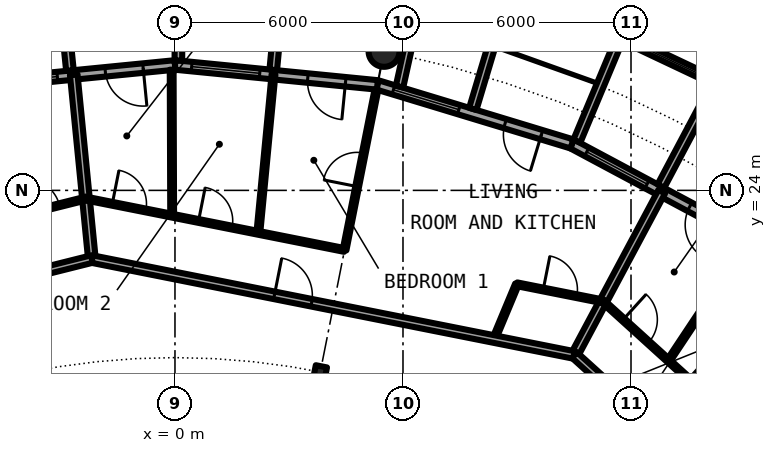
"""IFC4 building model, lengths in metres.
Left out: names, types, materials, properties, quantities, classifications, styles, units other than length and angle.
Written with IfcOpenShell. Run it as: python <this file> out.ifc"""

import sys

from ifc_helpers import new_model, si_unit, direction, frame, frame_2d, origin, origin_2d, place, context, subcontext, project, spatial, rectangle, circle, hollow_circle, i_section, extrude, element, fill, save


model = new_model("IFC4")
c1 = context("Model", 3, precision=1e-05, world=origin(), true_north=direction((0.0, 1.0)))
c2 = subcontext(c1, "Body", "Model", "MODEL_VIEW")
j1 = project(units=[si_unit("LENGTHUNIT", "METRE"), si_unit("PLANEANGLEUNIT", "RADIAN")], contexts=[c1])
p1 = place(None, origin())
s1 = spatial("IfcSite", under=j1, at=p1, CompositionType="ELEMENT")
p2 = place(p1, origin())
s2 = spatial("IfcBuilding", under=s1, at=p2, CompositionType="ELEMENT")
p3 = place(p2, frame((0.0, 0.0, 227.95)))
s3 = spatial("IfcBuildingStorey", under=s2, at=p3, CompositionType="ELEMENT", Elevation=227.95)
p4 = place(p3, frame((5.501, 27.658, 0.0), z_axis=(0.0, 0.0, 1.0), x_axis=(1.0, 0.0, 0.0)))
e1 = element("IfcColumn", 1, at=p4, inside=s3, PredefinedType="COLUMN", context=c2, shape_type="SweptSolid", body=[
    extrude(hollow_circle(Radius=0.406, WallThickness=0.03, at=origin_2d()), origin(), (0.0, 0.0, 1.0), 3.05),
])
p5 = place(p3, frame((3.824, 19.223, 0.0), z_axis=(0.0, 0.0, 1.0), x_axis=(0.195090322016, 0.980785280403, 0.0)))
e2 = element("IfcColumn", 2, at=p5, inside=s3, PredefinedType="COLUMN", context=c2, shape_type="SweptSolid", body=[
    extrude(i_section(OverallWidth=0.3, OverallDepth=0.3, WebThickness=0.011, FlangeThickness=0.019, FilletRadius=0.027, at=origin_2d()), origin(), (0.0, 0.0, 1.0), 3.05),
])
p6 = place(p3, frame((15.167, 22.699, 0.0), z_axis=(0.0, 0.0, 1.0), x_axis=(-0.881915646801, 0.471407246368, 0.0)))
e3 = element("IfcWall", 3, at=p6, inside=s3, PredefinedType="SOLIDWALL", context=c2, shape_type="SweptSolid", body=[
    extrude(rectangle(XDim=5.352, YDim=0.25, at=frame_2d((2.676, 0.0))), origin(), (0.0, 0.0, 1.0), 2.7),
])
p7 = place(p6, frame((0.841, 0.0, 0.0)))
e4 = element("IfcOpeningElement", 4, at=p7, cuts=e3, PredefinedType="OPENING", context=c2, shape_type="SweptSolid", body=[
    extrude(rectangle(XDim=1.0, YDim=2.2, at=frame_2d((0.5, 1.1))), frame((0.0, 0.135, 0.0), z_axis=(0.0, -1.0, 0.0), x_axis=(1.0, 0.0, 0.0)), (0.0, 0.0, 1.0), 0.27),
])
p8 = place(p6, frame((3.111, 0.0, 0.3)))
e5 = element("IfcOpeningElement", 5, at=p8, cuts=e3, PredefinedType="OPENING", context=c2, shape_type="SweptSolid", body=[
    extrude(rectangle(XDim=1.8, YDim=2.1, at=frame_2d((0.9, 1.05))), frame((0.0, 0.135, 0.0), z_axis=(0.0, -1.0, 0.0), x_axis=(1.0, 0.0, 0.0)), (0.0, 0.0, 1.0), 0.27),
])
p9 = place(p3, frame((14.335, 26.808, -0.03), z_axis=(0.0, 0.0, 1.0), x_axis=(-0.904000060331, 0.427532327342, 0.0)))
e6 = element("IfcWall", 6, at=p9, inside=s3, PredefinedType="SOLIDWALL", context=c2, shape_type="SweptSolid", body=[
    extrude(rectangle(XDim=2.993, YDim=0.2, at=frame_2d((1.497, 0.0))), origin(), (0.0, 0.0, 1.0), 2.73),
])
p10 = place(p9, frame((0.457, 0.0, 0.33)))
e7 = element("IfcOpeningElement", 7, at=p10, cuts=e6, PredefinedType="OPENING", context=c2, shape_type="SweptSolid", body=[
    extrude(circle(Radius=1.04, at=frame_2d((1.04, 1.04))), frame((0.0, 0.11, 0.0), z_axis=(0.0, -1.0, 0.0), x_axis=(1.0, 0.0, 0.0)), (0.0, 0.0, 1.0), 0.22),
])
p11 = place(p3, frame((12.787, 24.113, -0.03), z_axis=(0.0, 0.0, 1.0), x_axis=(0.468365282436, 0.883534924159, 0.0)))
e8 = element("IfcWall", 8, at=p11, inside=s3, PredefinedType="SOLIDWALL", context=c2, shape_type="SweptSolid", body=[
    extrude(rectangle(XDim=3.006, YDim=0.2, at=frame_2d((1.503, 0.0))), origin(), (0.0, 0.0, 1.0), 2.73),
])
p12 = place(p3, frame((10.575, 25.295, -0.03), z_axis=(0.0, 0.0, 1.0), x_axis=(0.385697364644, 0.922625353492, 0.0)))
e9 = element("IfcWall", 9, at=p12, inside=s3, PredefinedType="SOLIDWALL", context=c2, shape_type="SweptSolid", body=[
    extrude(rectangle(XDim=2.883, YDim=0.2, at=frame_2d((1.442, 0.0))), origin(), (0.0, 0.0, 1.0), 2.73),
])
p13 = place(p3, frame((10.447, 25.222, 0.0), z_axis=(0.0, 0.0, 1.0), x_axis=(-0.956965678721, 0.290201119486, 0.0)))
e10 = element("IfcWall", 10, at=p13, inside=s3, PredefinedType="SOLIDWALL", context=c2, shape_type="SweptSolid", body=[
    extrude(rectangle(XDim=5.351, YDim=0.25, at=frame_2d((2.676, 0.0))), origin(), (0.0, 0.0, 1.0), 2.7),
])
p14 = place(p13, frame((0.841, 0.0, 0.0)))
e11 = element("IfcOpeningElement", 11, at=p14, cuts=e10, PredefinedType="OPENING", context=c2, shape_type="SweptSolid", body=[
    extrude(rectangle(XDim=1.0, YDim=2.2, at=frame_2d((0.5, 1.1))), frame((0.0, 0.135, 0.0), z_axis=(0.0, -1.0, 0.0), x_axis=(1.0, 0.0, 0.0)), (0.0, 0.0, 1.0), 0.27),
])
p15 = place(p13, frame((3.111, 0.0, 0.3)))
e12 = element("IfcOpeningElement", 12, at=p15, cuts=e10, PredefinedType="OPENING", context=c2, shape_type="SweptSolid", body=[
    extrude(rectangle(XDim=1.8, YDim=2.1, at=frame_2d((0.9, 1.05))), frame((0.0, 0.135, 0.0), z_axis=(0.0, -1.0, 0.0), x_axis=(1.0, 0.0, 0.0)), (0.0, 0.0, 1.0), 0.27),
])
p16 = place(p3, frame((7.837, 26.144, -0.03), z_axis=(0.0, 0.0, 1.0), x_axis=(0.287064767992, 0.957911174889, 0.0)))
e13 = element("IfcWall", 13, at=p16, inside=s3, PredefinedType="SOLIDWALL", context=c2, shape_type="SweptSolid", body=[
    extrude(rectangle(XDim=3.006, YDim=0.2, at=frame_2d((1.503, 0.0))), origin(), (0.0, 0.0, 1.0), 2.73),
])
p17 = place(p3, frame((5.909, 26.729, -0.03), z_axis=(0.0, 0.0, 1.0), x_axis=(0.216409053917, 0.976302781612, 0.0)))
e14 = element("IfcWall", 14, at=p17, inside=s3, PredefinedType="SOLIDWALL", context=c2, shape_type="SweptSolid", body=[
    extrude(rectangle(XDim=2.925, YDim=0.2, at=frame_2d((1.463, 0.0))), origin(), (0.0, 0.0, 1.0), 2.73),
])
p18 = place(p3, frame((5.326, 26.775, 0.0), z_axis=(0.0, 0.0, 1.0), x_axis=(-0.995173996315, 0.098126026407, 0.0)))
e15 = element("IfcWall", 15, at=p18, inside=s3, PredefinedType="SOLIDWALL", context=c2, shape_type="SweptSolid", body=[
    extrude(rectangle(XDim=5.352, YDim=0.25, at=frame_2d((2.676, 0.0))), origin(), (0.0, 0.0, 1.0), 2.7),
])
p19 = place(p18, frame((0.841, 0.0, 0.0)))
e16 = element("IfcOpeningElement", 16, at=p19, cuts=e15, PredefinedType="OPENING", context=c2, shape_type="SweptSolid", body=[
    extrude(rectangle(XDim=1.0, YDim=2.2, at=frame_2d((0.5, 1.1))), frame((0.0, 0.135, 0.0), z_axis=(0.0, -1.0, 0.0), x_axis=(1.0, 0.0, 0.0)), (0.0, 0.0, 1.0), 0.27),
])
p20 = place(p18, frame((3.111, 0.0, 0.3)))
e17 = element("IfcOpeningElement", 17, at=p20, cuts=e15, PredefinedType="OPENING", context=c2, shape_type="SweptSolid", body=[
    extrude(rectangle(XDim=1.8, YDim=2.1, at=frame_2d((0.9, 1.05))), frame((0.0, 0.135, 0.0), z_axis=(0.0, -1.0, 0.0), x_axis=(1.0, 0.0, 0.0)), (0.0, 0.0, 1.0), 0.27),
])
p21 = place(p3, frame((2.586, 27.171, -0.03), z_axis=(0.0, 0.0, 1.0), x_axis=(0.094548432284, 0.995520262954, 0.0)))
e18 = element("IfcWall", 18, at=p21, inside=s3, PredefinedType="SOLIDWALL", context=c2, shape_type="SweptSolid", body=[
    extrude(rectangle(XDim=3.006, YDim=0.2, at=frame_2d((1.503, 0.0))), origin(), (0.0, 0.0, 1.0), 2.73),
])
p22 = place(p3, frame((0.09, 27.417, -0.03), z_axis=(0.0, 0.0, 1.0), x_axis=(0.00347308367, 0.999993968827, 0.0)))
e19 = element("IfcWall", 19, at=p22, inside=s3, PredefinedType="SOLIDWALL", context=c2, shape_type="SweptSolid", body=[
    extrude(rectangle(XDim=2.882, YDim=0.2, at=frame_2d((1.441, 0.0))), origin(), (0.0, 0.0, 1.0), 2.73),
])
p23 = place(p3, frame((0.0, 27.3, 0.0), z_axis=(0.0, 0.0, 1.0), x_axis=(-0.995173996315, -0.098126026407, 0.0)))
e20 = element("IfcWall", 20, at=p23, inside=s3, PredefinedType="SOLIDWALL", context=c2, shape_type="SweptSolid", body=[
    extrude(rectangle(XDim=5.352, YDim=0.25, at=frame_2d((2.676, 0.0))), origin(), (0.0, 0.0, 1.0), 2.7),
])
p24 = place(p23, frame((0.841, 0.0, 0.0)))
e21 = element("IfcOpeningElement", 21, at=p24, cuts=e20, PredefinedType="OPENING", context=c2, shape_type="SweptSolid", body=[
    extrude(rectangle(XDim=1.0, YDim=2.2, at=frame_2d((0.5, 1.1))), frame((0.0, 0.135, 0.0), z_axis=(0.0, -1.0, 0.0), x_axis=(1.0, 0.0, 0.0)), (0.0, 0.0, 1.0), 0.27),
])
p25 = place(p23, frame((3.111, 0.0, 0.3)))
e22 = element("IfcOpeningElement", 22, at=p25, cuts=e20, PredefinedType="OPENING", context=c2, shape_type="SweptSolid", body=[
    extrude(rectangle(XDim=1.8, YDim=2.1, at=frame_2d((0.9, 1.05))), frame((0.0, 0.135, 0.0), z_axis=(0.0, -1.0, 0.0), x_axis=(1.0, 0.0, 0.0)), (0.0, 0.0, 1.0), 0.27),
])
p26 = place(p3, frame((-2.764, 27.153, -0.03), z_axis=(0.0, 0.0, 1.0), x_axis=(-0.101505487237, 0.994834979311, 0.0)))
e23 = element("IfcWall", 23, at=p26, inside=s3, PredefinedType="SOLIDWALL", context=c2, shape_type="SweptSolid", body=[
    extrude(rectangle(XDim=3.007, YDim=0.2, at=frame_2d((1.503, 0.0))), origin(), (0.0, 0.0, 1.0), 2.73),
])
p27 = place(p3, frame((-2.664, 27.044, 0.0), z_axis=(0.0, 0.0, 1.0), x_axis=(0.098070432075, -0.995179476453, 0.0)))
e24 = element("IfcWall", 24, at=p27, inside=s3, PredefinedType="PARTITIONING", context=c2, shape_type="SweptSolid", body=[
    extrude(rectangle(XDim=4.874, YDim=0.2, at=frame_2d((2.437, 0.0))), origin(), (0.0, 0.0, 1.0), 2.7),
])
p28 = place(p3, frame((-0.074, 23.334, 0.0), z_axis=(0.0, 0.0, 1.0), x_axis=(-0.003368696325, 0.999994325926, 0.0)))
e25 = element("IfcWall", 25, at=p28, inside=s3, PredefinedType="PARTITIONING", context=c2, shape_type="SweptSolid", body=[
    extrude(rectangle(XDim=3.841, YDim=0.1, at=frame_2d((1.92, 0.0))), origin(), (0.0, 0.0, 1.0), 2.7),
])
p29 = place(p3, frame((2.194, 22.883, 0.0), z_axis=(0.0, 0.0, 1.0), x_axis=(0.095276864271, 0.995450812012, 0.0)))
e26 = element("IfcWall", 26, at=p29, inside=s3, PredefinedType="PARTITIONING", context=c2, shape_type="SweptSolid", body=[
    extrude(rectangle(XDim=4.187, YDim=0.1, at=frame_2d((2.094, 0.0))), origin(), (0.0, 0.0, 1.0), 2.7),
])
p30 = place(p3, frame((4.462, 22.431, 0.0), z_axis=(0.0, 0.0, 1.0), x_axis=(0.195145394338, 0.98077432423, 0.0)))
e27 = element("IfcWall", 27, at=p30, inside=s3, PredefinedType="PARTITIONING", context=c2, shape_type="SweptSolid", body=[
    extrude(rectangle(XDim=4.305, YDim=0.1, at=frame_2d((2.152, 0.0))), origin(), (0.0, 0.0, 1.0), 2.7),
])
p31 = place(p30, frame((1.702, 0.0, 0.0)))
e28 = element("IfcOpeningElement", 28, at=p31, cuts=e27, PredefinedType="OPENING", context=c2, shape_type="SweptSolid", body=[
    extrude(rectangle(XDim=0.9, YDim=2.3, at=frame_2d((0.45, 1.15))), frame((0.0, 0.06, 0.0), z_axis=(0.0, -1.0, 0.0), x_axis=(1.0, 0.0, 0.0)), (0.0, 0.0, 1.0), 0.12),
])
p32 = place(p3, frame((8.396, 20.088, 0.0), z_axis=(0.0, 0.0, 1.0), x_axis=(0.385469858593, 0.922720427929, 0.0)))
e29 = element("IfcWall", 29, at=p32, inside=s3, PredefinedType="PARTITIONING", context=c2, shape_type="SweptSolid", body=[
    extrude(rectangle(XDim=1.562, YDim=0.1, at=frame_2d((0.781, 0.0))), origin(), (0.0, 0.0, 1.0), 2.7),
])
p33 = place(p3, frame((10.512, 19.667, 0.0), z_axis=(0.0, 0.0, 1.0), x_axis=(0.471271812246, 0.881988026553, 0.0)))
e30 = element("IfcWall", 30, at=p33, inside=s3, PredefinedType="PARTITIONING", context=c2, shape_type="SweptSolid", body=[
    extrude(rectangle(XDim=4.874, YDim=0.2, at=frame_2d((2.437, 0.0))), origin(), (0.0, 0.0, 1.0), 2.7),
])
p34 = place(p3, frame((12.988, 19.518, 0.0), z_axis=(0.0, 0.0, 1.0), x_axis=(0.553823887887, 0.83263383381, 0.0)))
e31 = element("IfcWall", 31, at=p34, inside=s3, PredefinedType="PARTITIONING", context=c2, shape_type="SweptSolid", body=[
    extrude(rectangle(XDim=3.73, YDim=0.1, at=frame_2d((1.865, 0.0))), origin(), (0.0, 0.0, 1.0), 2.7),
])
p35 = place(p3, frame((-2.186, 22.193, 0.0), z_axis=(0.0, 0.0, 1.0), x_axis=(0.980780341017, -0.195115152343, 0.0)))
e32 = element("IfcWall", 32, at=p35, inside=s3, PredefinedType="PARTITIONING", context=c2, shape_type="SweptSolid", body=[
    extrude(rectangle(XDim=12.947, YDim=0.2, at=frame_2d((6.473, 0.0))), origin(), (0.0, 0.0, 1.0), 2.7),
])
p36 = place(p35, frame((4.895, 0.0, 0.0)))
e33 = element("IfcOpeningElement", 33, at=p36, cuts=e32, PredefinedType="OPENING", context=c2, shape_type="SweptSolid", body=[
    extrude(rectangle(XDim=1.0, YDim=2.3, at=frame_2d((0.5, 1.15))), frame((0.0, 0.11, 0.0), z_axis=(0.0, -1.0, 0.0), x_axis=(1.0, 0.0, 0.0)), (0.0, 0.0, 1.0), 0.22),
])
p37 = place(p3, frame((10.512, 19.667, 0.0), z_axis=(0.0, 0.0, 1.0), x_axis=(0.740947367223, -0.671563101283, 0.0)))
e34 = element("IfcWall", 34, at=p37, inside=s3, PredefinedType="PARTITIONING", context=c2, shape_type="SweptSolid", body=[
    extrude(rectangle(XDim=10.837, YDim=0.2, at=frame_2d((5.419, 0.0))), origin(), (0.0, 0.0, 1.0), 2.7),
])
p38 = place(p37, frame((3.835, 0.0, 0.0)))
e35 = element("IfcOpeningElement", 35, at=p38, cuts=e34, PredefinedType="OPENING", context=c2, shape_type="SweptSolid", body=[
    extrude(rectangle(XDim=1.0, YDim=2.3, at=frame_2d((0.5, 1.15))), frame((0.0, 0.11, 0.0), z_axis=(0.0, -1.0, 0.0), x_axis=(1.0, 0.0, 0.0)), (0.0, 0.0, 1.0), 0.22),
])
p39 = place(p3, frame((-8.534, 20.603, 0.0), z_axis=(0.0, 0.0, 1.0), x_axis=(0.97003047456, 0.242983288366, 0.0)))
e36 = element("IfcWall", 36, at=p39, inside=s3, PredefinedType="PARTITIONING", context=c2, shape_type="SweptSolid", body=[
    extrude(rectangle(XDim=6.544, YDim=0.2, at=frame_2d((3.272, 0.0))), origin(), (0.0, 0.0, 1.0), 2.7),
])
p40 = place(p39, frame((1.681, 0.0, 0.0)))
e37 = element("IfcOpeningElement", 37, at=p40, cuts=e36, PredefinedType="OPENING", context=c2, shape_type="SweptSolid", body=[
    extrude(rectangle(XDim=1.0, YDim=2.3, at=frame_2d((0.5, 1.15))), frame((0.0, 0.11, 0.0), z_axis=(0.0, -1.0, 0.0), x_axis=(1.0, 0.0, 0.0)), (0.0, 0.0, 1.0), 0.22),
])
p41 = place(p3, frame((-2.346, 23.785, 0.0), z_axis=(0.0, 0.0, 1.0), x_axis=(0.98080065826, -0.195012996379, 0.0)))
e38 = element("IfcWall", 38, at=p41, inside=s3, PredefinedType="PARTITIONING", context=c2, shape_type="SweptSolid", body=[
    extrude(rectangle(XDim=6.938, YDim=0.1, at=frame_2d((3.469, 0.0))), origin(), (0.0, 0.0, 1.0), 2.7),
])
p42 = place(p41, frame((3.024, 0.0, 0.0)))
e39 = element("IfcOpeningElement", 39, at=p42, cuts=e38, PredefinedType="OPENING", context=c2, shape_type="SweptSolid", body=[
    extrude(rectangle(XDim=0.9, YDim=2.3, at=frame_2d((0.45, 1.15))), frame((0.0, 0.06, 0.0), z_axis=(0.0, -1.0, 0.0), x_axis=(1.0, 0.0, 0.0)), (0.0, 0.0, 1.0), 0.12),
])
p43 = place(p41, frame((0.71, 0.0, 0.0)))
e40 = element("IfcOpeningElement", 40, at=p43, cuts=e38, PredefinedType="OPENING", context=c2, shape_type="SweptSolid", body=[
    extrude(rectangle(XDim=0.9, YDim=2.3, at=frame_2d((0.45, 1.15))), frame((0.0, 0.06, 0.0), z_axis=(0.0, -1.0, 0.0), x_axis=(1.0, 0.0, 0.0)), (0.0, 0.0, 1.0), 0.12),
])
p44 = place(p3, frame((8.998, 21.529, 0.0), z_axis=(0.0, 0.0, 1.0), x_axis=(0.980783177308, -0.19510089469, 0.0)))
e41 = element("IfcWall", 41, at=p44, inside=s3, PredefinedType="PARTITIONING", context=c2, shape_type="SweptSolid", body=[
    extrude(rectangle(XDim=2.312, YDim=0.1, at=frame_2d((1.156, 0.0))), origin(), (0.0, 0.0, 1.0), 2.7),
])
p45 = place(p44, frame((0.706, 0.0, 0.0)))
e42 = element("IfcOpeningElement", 42, at=p45, cuts=e41, PredefinedType="OPENING", context=c2, shape_type="SweptSolid", body=[
    extrude(rectangle(XDim=0.9, YDim=2.3, at=frame_2d((0.45, 1.15))), frame((0.0, 0.06, 0.0), z_axis=(0.0, -1.0, 0.0), x_axis=(1.0, 0.0, 0.0)), (0.0, 0.0, 1.0), 0.12),
])
p46 = place(p3, frame((11.266, 21.078, 0.0), z_axis=(0.0, 0.0, 1.0), x_axis=(0.74097115376, -0.671536856245, 0.0)))
e43 = element("IfcWall", 43, at=p46, inside=s3, PredefinedType="PARTITIONING", context=c2, shape_type="SweptSolid", body=[
    extrude(rectangle(XDim=6.969, YDim=0.1, at=frame_2d((3.484, 0.0))), origin(), (0.0, 0.0, 1.0), 2.7),
])
p47 = place(p46, frame((3.034, 0.0, 0.0)))
e44 = element("IfcOpeningElement", 44, at=p47, cuts=e43, PredefinedType="OPENING", context=c2, shape_type="SweptSolid", body=[
    extrude(rectangle(XDim=0.9, YDim=2.3, at=frame_2d((0.45, 1.15))), frame((0.0, 0.06, 0.0), z_axis=(0.0, -1.0, 0.0), x_axis=(1.0, 0.0, 0.0)), (0.0, 0.0, 1.0), 0.12),
])
p48 = place(p46, frame((0.712, 0.0, 0.0)))
e45 = element("IfcOpeningElement", 45, at=p48, cuts=e43, PredefinedType="OPENING", context=c2, shape_type="SweptSolid", body=[
    extrude(rectangle(XDim=0.9, YDim=2.3, at=frame_2d((0.45, 1.15))), frame((0.0, 0.06, 0.0), z_axis=(0.0, -1.0, 0.0), x_axis=(1.0, 0.0, 0.0)), (0.0, 0.0, 1.0), 0.12),
])
p49 = place(p3, frame((-4.61, 23.217, 0.0), z_axis=(0.0, 0.0, 1.0), x_axis=(0.970031792706, 0.242978026043, 0.0)))
e46 = element("IfcWall", 46, at=p49, inside=s3, PredefinedType="PARTITIONING", context=c2, shape_type="SweptSolid", body=[
    extrude(rectangle(XDim=2.337, YDim=0.1, at=frame_2d((1.168, 0.0))), origin(), (0.0, 0.0, 1.0), 2.7),
])
p50 = place(p49, frame((0.719, 0.0, 0.0)))
e47 = element("IfcOpeningElement", 47, at=p50, cuts=e46, PredefinedType="OPENING", context=c2, shape_type="SweptSolid", body=[
    extrude(rectangle(XDim=0.9, YDim=2.3, at=frame_2d((0.45, 1.15))), frame((0.0, 0.06, 0.0), z_axis=(0.0, -1.0, 0.0), x_axis=(1.0, 0.0, 0.0)), (0.0, 0.0, 1.0), 0.12),
])
p51 = place(p7, origin())
e48 = element("IfcDoor", 48, at=p51, inside=s3, OperationType="SINGLE_SWING_LEFT", PredefinedType="DOOR", context=c2, shape_type="SweptSolid", body=[
    extrude(rectangle(XDim=1.0, YDim=2.2, at=frame_2d((0.5, 1.1))), frame((0.0, 0.025, 0.0), z_axis=(0.0, -1.0, 0.0), x_axis=(1.0, 0.0, 0.0)), (0.0, 0.0, 1.0), 0.05),
])
fill(e4, e48)
p52 = place(p8, origin())
e49 = element("IfcWindow", 49, at=p52, inside=s3, PartitioningType="SINGLE_PANEL", PredefinedType="WINDOW", context=c2, shape_type="SweptSolid", body=[
    extrude(rectangle(XDim=1.8, YDim=2.1, at=frame_2d((0.9, 1.05))), frame((0.0, 0.03, 0.0), z_axis=(0.0, -1.0, 0.0), x_axis=(1.0, 0.0, 0.0)), (0.0, 0.0, 1.0), 0.06),
])
fill(e5, e49)
p53 = place(p10, origin())
e50 = element("IfcWindow", 50, at=p53, inside=s3, PartitioningType="SINGLE_PANEL", PredefinedType="WINDOW", context=c2, shape_type="SweptSolid", body=[
    extrude(circle(Radius=1.04, at=frame_2d((1.04, 1.04))), frame((0.0, 0.03, 0.0), z_axis=(0.0, -1.0, 0.0), x_axis=(1.0, 0.0, 0.0)), (0.0, 0.0, 1.0), 0.06),
])
fill(e7, e50)
p54 = place(p14, origin())
e51 = element("IfcDoor", 51, at=p54, inside=s3, OperationType="SINGLE_SWING_LEFT", PredefinedType="DOOR", context=c2, shape_type="SweptSolid", body=[
    extrude(rectangle(XDim=1.0, YDim=2.2, at=frame_2d((0.5, 1.1))), frame((0.0, 0.025, 0.0), z_axis=(0.0, -1.0, 0.0), x_axis=(1.0, 0.0, 0.0)), (0.0, 0.0, 1.0), 0.05),
])
fill(e11, e51)
p55 = place(p15, origin())
e52 = element("IfcWindow", 52, at=p55, inside=s3, PartitioningType="SINGLE_PANEL", PredefinedType="WINDOW", context=c2, shape_type="SweptSolid", body=[
    extrude(rectangle(XDim=1.8, YDim=2.1, at=frame_2d((0.9, 1.05))), frame((0.0, 0.03, 0.0), z_axis=(0.0, -1.0, 0.0), x_axis=(1.0, 0.0, 0.0)), (0.0, 0.0, 1.0), 0.06),
])
fill(e12, e52)
p56 = place(p19, origin())
e53 = element("IfcDoor", 53, at=p56, inside=s3, OperationType="SINGLE_SWING_LEFT", PredefinedType="DOOR", context=c2, shape_type="SweptSolid", body=[
    extrude(rectangle(XDim=1.0, YDim=2.2, at=frame_2d((0.5, 1.1))), frame((0.0, 0.025, 0.0), z_axis=(0.0, -1.0, 0.0), x_axis=(1.0, 0.0, 0.0)), (0.0, 0.0, 1.0), 0.05),
])
fill(e16, e53)
p57 = place(p20, origin())
e54 = element("IfcWindow", 54, at=p57, inside=s3, PartitioningType="SINGLE_PANEL", PredefinedType="WINDOW", context=c2, shape_type="SweptSolid", body=[
    extrude(rectangle(XDim=1.8, YDim=2.1, at=frame_2d((0.9, 1.05))), frame((0.0, 0.03, 0.0), z_axis=(0.0, -1.0, 0.0), x_axis=(1.0, 0.0, 0.0)), (0.0, 0.0, 1.0), 0.06),
])
fill(e17, e54)
p58 = place(p24, origin())
e55 = element("IfcDoor", 55, at=p58, inside=s3, OperationType="SINGLE_SWING_LEFT", PredefinedType="DOOR", context=c2, shape_type="SweptSolid", body=[
    extrude(rectangle(XDim=1.0, YDim=2.2, at=frame_2d((0.5, 1.1))), frame((0.0, 0.025, 0.0), z_axis=(0.0, -1.0, 0.0), x_axis=(1.0, 0.0, 0.0)), (0.0, 0.0, 1.0), 0.05),
])
fill(e21, e55)
p59 = place(p25, origin())
e56 = element("IfcWindow", 56, at=p59, inside=s3, PartitioningType="SINGLE_PANEL", PredefinedType="WINDOW", context=c2, shape_type="SweptSolid", body=[
    extrude(rectangle(XDim=1.8, YDim=2.1, at=frame_2d((0.9, 1.05))), frame((0.0, 0.03, 0.0), z_axis=(0.0, -1.0, 0.0), x_axis=(1.0, 0.0, 0.0)), (0.0, 0.0, 1.0), 0.06),
])
fill(e22, e56)
p60 = place(p48, origin())
e57 = element("IfcDoor", 57, at=p60, inside=s3, OperationType="SINGLE_SWING_LEFT", PredefinedType="DOOR", context=c2, shape_type="SweptSolid", body=[
    extrude(rectangle(XDim=0.9, YDim=2.3, at=frame_2d((0.45, 1.15))), frame((0.0, 0.025, 0.0), z_axis=(0.0, -1.0, 0.0), x_axis=(1.0, 0.0, 0.0)), (0.0, 0.0, 1.0), 0.05),
])
fill(e45, e57)
p61 = place(p36, origin())
e58 = element("IfcDoor", 58, at=p61, inside=s3, OperationType="SINGLE_SWING_LEFT", PredefinedType="DOOR", context=c2, shape_type="SweptSolid", body=[
    extrude(rectangle(XDim=1.0, YDim=2.3, at=frame_2d((0.5, 1.15))), frame((0.0, 0.025, 0.0), z_axis=(0.0, -1.0, 0.0), x_axis=(1.0, 0.0, 0.0)), (0.0, 0.0, 1.0), 0.05),
])
fill(e33, e58)
p62 = place(p45, origin())
e59 = element("IfcDoor", 59, at=p62, inside=s3, OperationType="SINGLE_SWING_RIGHT", PredefinedType="DOOR", context=c2, shape_type="SweptSolid", body=[
    extrude(rectangle(XDim=0.9, YDim=2.3, at=frame_2d((0.45, 1.15))), frame((0.0, 0.025, 0.0), z_axis=(0.0, -1.0, 0.0), x_axis=(1.0, 0.0, 0.0)), (0.0, 0.0, 1.0), 0.05),
])
fill(e42, e59)
p63 = place(p31, origin())
e60 = element("IfcDoor", 60, at=p63, inside=s3, OperationType="SINGLE_SWING_RIGHT", PredefinedType="DOOR", context=c2, shape_type="SweptSolid", body=[
    extrude(rectangle(XDim=0.9, YDim=2.3, at=frame_2d((0.45, 1.15))), frame((0.0, 0.025, 0.0), z_axis=(0.0, -1.0, 0.0), x_axis=(1.0, 0.0, 0.0)), (0.0, 0.0, 1.0), 0.05),
])
fill(e28, e60)
p64 = place(p42, origin())
e61 = element("IfcDoor", 61, at=p64, inside=s3, OperationType="SINGLE_SWING_RIGHT", PredefinedType="DOOR", context=c2, shape_type="SweptSolid", body=[
    extrude(rectangle(XDim=0.9, YDim=2.3, at=frame_2d((0.45, 1.15))), frame((0.0, 0.025, 0.0), z_axis=(0.0, -1.0, 0.0), x_axis=(1.0, 0.0, 0.0)), (0.0, 0.0, 1.0), 0.05),
])
fill(e39, e61)
p65 = place(p43, origin())
e62 = element("IfcDoor", 62, at=p65, inside=s3, OperationType="SINGLE_SWING_LEFT", PredefinedType="DOOR", context=c2, shape_type="SweptSolid", body=[
    extrude(rectangle(XDim=0.9, YDim=2.3, at=frame_2d((0.45, 1.15))), frame((0.0, 0.025, 0.0), z_axis=(0.0, -1.0, 0.0), x_axis=(1.0, 0.0, 0.0)), (0.0, 0.0, 1.0), 0.05),
])
fill(e40, e62)
p66 = place(p50, origin())
e63 = element("IfcDoor", 63, at=p66, inside=s3, OperationType="SINGLE_SWING_LEFT", PredefinedType="DOOR", context=c2, shape_type="SweptSolid", body=[
    extrude(rectangle(XDim=0.9, YDim=2.3, at=frame_2d((0.45, 1.15))), frame((0.0, 0.025, 0.0), z_axis=(0.0, -1.0, 0.0), x_axis=(1.0, 0.0, 0.0)), (0.0, 0.0, 1.0), 0.05),
])
fill(e47, e63)
save(model, sys.argv[1])
